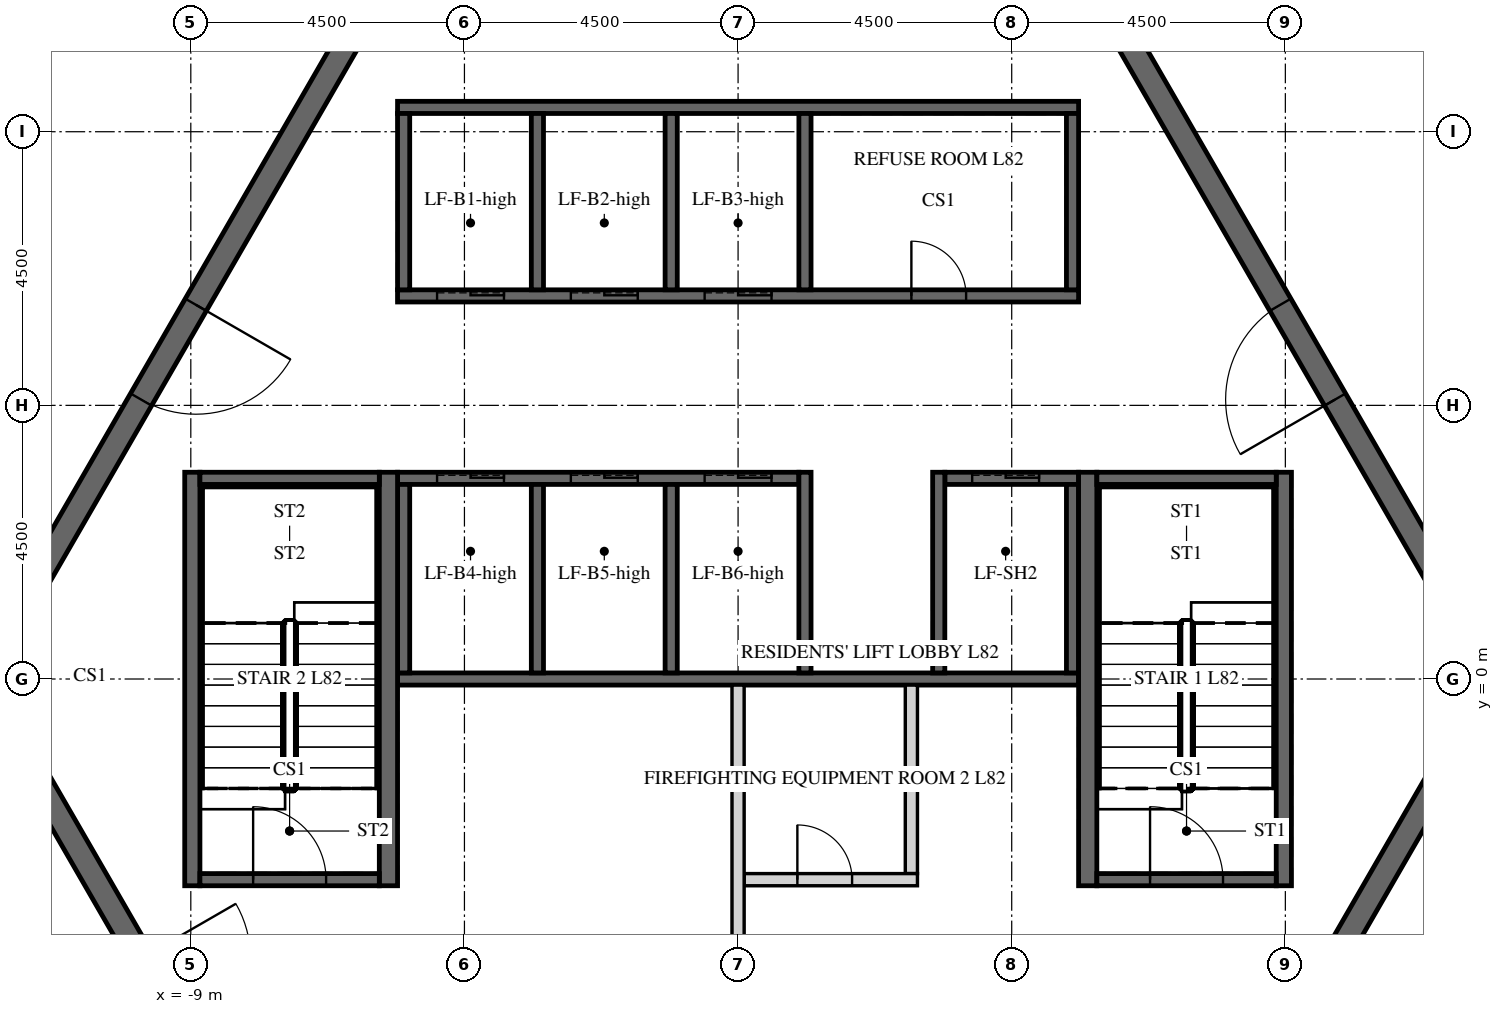
"""IFC4 building model, lengths in metres.
Left out: names, types, materials, properties, quantities, classifications, styles, units other than length and angle.
Written with IfcOpenShell. Run it as: python <this file> out.ifc"""

import sys

from ifc_helpers import new_model, si_unit, direction, frame, frame_2d, origin, place, context, subcontext, project, spatial, polyline, rectangle, outline, extrude, element, fill, save


model = new_model("IFC4")
c1 = context("Model", 3, precision=1e-05, world=origin(), true_north=direction((0.0, 1.0)))
c2 = subcontext(c1, "Body", "Model", "MODEL_VIEW")
j1 = project(units=[si_unit("LENGTHUNIT", "METRE"), si_unit("PLANEANGLEUNIT", "RADIAN")], contexts=[c1])
p1 = place(None, origin())
s1 = spatial("IfcSite", under=j1, at=p1, CompositionType="ELEMENT")
p2 = place(p1, origin())
s2 = spatial("IfcBuilding", under=s1, at=p2, CompositionType="ELEMENT")
p3 = place(p2, frame((0.0, 0.0, 338.1)))
s3 = spatial("IfcBuildingStorey", under=s2, at=p3, CompositionType="ELEMENT", Elevation=338.1)
p4 = place(p3, frame((-6.235, 10.8, -0.3), z_axis=(0.0, 0.0, 1.0), x_axis=(-0.499996419489, -0.866027470984, 0.0)))
e1 = element("IfcWall", 1, at=p4, inside=s3, PredefinedType="SHEAR", context=c2, shape_type="SweptSolid", body=[
    extrude(outline(polyline([(-0.115, -0.2), (12.586, -0.2), (12.355, 0.2), (0.115, 0.2), (-0.115, -0.2)])), origin(), (0.0, 0.0, 1.0), 5.4),
])
p5 = place(p4, frame((5.364, 0.0, 0.3)))
e2 = element("IfcOpeningElement", 2, at=p5, cuts=e1, PredefinedType="OPENING", context=c2, shape_type="SweptSolid", body=[
    extrude(rectangle(XDim=1.8, YDim=2.4, at=frame_2d((0.9, 1.2))), frame((0.0, 0.21, 0.0), z_axis=(0.0, -1.0, 0.0), x_axis=(1.0, 0.0, 0.0)), (0.0, 0.0, 1.0), 0.42),
])
p6 = place(p3, frame((-12.471, 0.0, -0.3), z_axis=(0.0, 0.0, 1.0), x_axis=(0.499996419489, -0.866027470984, 0.0)))
e3 = element("IfcWall", 3, at=p6, inside=s3, PredefinedType="SHEAR", context=c2, shape_type="SweptSolid", body=[
    extrude(outline(polyline([(-0.115, -0.2), (12.586, -0.2), (12.355, 0.2), (0.115, 0.2), (-0.115, -0.2)])), origin(), (0.0, 0.0, 1.0), 5.4),
])
p7 = place(p6, frame((5.306, 0.0, 0.3)))
e4 = element("IfcOpeningElement", 4, at=p7, cuts=e3, PredefinedType="OPENING", context=c2, shape_type="SweptSolid", body=[
    extrude(rectangle(XDim=1.8, YDim=2.4, at=frame_2d((0.9, 1.2))), frame((0.0, 0.21, 0.0), z_axis=(0.0, -1.0, 0.0), x_axis=(1.0, 0.0, 0.0)), (0.0, 0.0, 1.0), 0.42),
])
p8 = place(p3, frame((6.235, -10.8, -0.3), z_axis=(0.0, 0.0, 1.0), x_axis=(0.499996419489, 0.866027470984, 0.0)))
e5 = element("IfcWall", 5, at=p8, inside=s3, PredefinedType="SHEAR", context=c2, shape_type="SweptSolid", body=[
    extrude(outline(polyline([(-0.115, -0.2), (12.586, -0.2), (12.355, 0.2), (0.115, 0.2), (-0.115, -0.2)])), origin(), (0.0, 0.0, 1.0), 5.4),
])
p9 = place(p8, frame((5.364, 0.0, 0.3)))
e6 = element("IfcOpeningElement", 6, at=p9, cuts=e5, PredefinedType="OPENING", context=c2, shape_type="SweptSolid", body=[
    extrude(rectangle(XDim=1.8, YDim=2.4, at=frame_2d((0.9, 1.2))), frame((0.0, 0.21, 0.0), z_axis=(0.0, -1.0, 0.0), x_axis=(1.0, 0.0, 0.0)), (0.0, 0.0, 1.0), 0.42),
])
p10 = place(p3, frame((12.471, 0.0, -0.3), z_axis=(0.0, 0.0, 1.0), x_axis=(-0.499996419489, 0.866027470984, 0.0)))
e7 = element("IfcWall", 7, at=p10, inside=s3, PredefinedType="SHEAR", context=c2, shape_type="SweptSolid", body=[
    extrude(outline(polyline([(-0.115, -0.2), (12.586, -0.2), (12.355, 0.2), (0.115, 0.2), (-0.115, -0.2)])), origin(), (0.0, 0.0, 1.0), 5.4),
])
p11 = place(p10, frame((5.306, 0.0, 0.3)))
e8 = element("IfcOpeningElement", 8, at=p11, cuts=e7, PredefinedType="OPENING", context=c2, shape_type="SweptSolid", body=[
    extrude(rectangle(XDim=1.8, YDim=2.4, at=frame_2d((0.9, 1.2))), frame((0.0, 0.21, 0.0), z_axis=(0.0, -1.0, 0.0), x_axis=(1.0, 0.0, 0.0)), (0.0, 0.0, 1.0), 0.42),
])
p12 = place(p3, frame((-5.6, 6.3, -0.25), z_axis=(0.0, 0.0, 1.0), x_axis=(1.0, 0.0, 0.0)))
e9 = element("IfcWall", 9, at=p12, inside=s3, PredefinedType="SHEAR", context=c2, shape_type="SweptSolid", body=[
    extrude(rectangle(XDim=11.2, YDim=0.2, at=frame_2d((5.6, 0.0))), origin(), (0.0, 0.0, 1.0), 5.4),
])
p13 = place(p12, frame((8.45, 0.0, 0.25)))
e10 = element("IfcOpeningElement", 10, at=p13, cuts=e9, PredefinedType="OPENING", context=c2, shape_type="SweptSolid", body=[
    extrude(rectangle(XDim=0.9, YDim=2.1, at=frame_2d((0.45, 1.05))), frame((0.0, 0.11, 0.0), z_axis=(0.0, -1.0, 0.0), x_axis=(1.0, 0.0, 0.0)), (0.0, 0.0, 1.0), 0.22),
])
p14 = place(p12, frame((0.65, 0.0, 0.25)))
e11 = element("IfcOpeningElement", 11, at=p14, cuts=e9, PredefinedType="OPENING", context=c2, shape_type="SweptSolid", body=[
    extrude(rectangle(XDim=1.1, YDim=2.1, at=frame_2d((0.55, 1.05))), frame((0.0, 0.11, 0.0), z_axis=(0.0, -1.0, 0.0), x_axis=(1.0, 0.0, 0.0)), (0.0, 0.0, 1.0), 0.22),
])
p15 = place(p12, frame((2.85, 0.0, 0.25)))
e12 = element("IfcOpeningElement", 12, at=p15, cuts=e9, PredefinedType="OPENING", context=c2, shape_type="SweptSolid", body=[
    extrude(rectangle(XDim=1.1, YDim=2.1, at=frame_2d((0.55, 1.05))), frame((0.0, 0.11, 0.0), z_axis=(0.0, -1.0, 0.0), x_axis=(1.0, 0.0, 0.0)), (0.0, 0.0, 1.0), 0.22),
])
p16 = place(p12, frame((5.05, 0.0, 0.25)))
e13 = element("IfcOpeningElement", 13, at=p16, cuts=e9, PredefinedType="OPENING", context=c2, shape_type="SweptSolid", body=[
    extrude(rectangle(XDim=1.1, YDim=2.1, at=frame_2d((0.55, 1.05))), frame((0.0, 0.11, 0.0), z_axis=(0.0, -1.0, 0.0), x_axis=(1.0, 0.0, 0.0)), (0.0, 0.0, 1.0), 0.22),
])
p17 = place(p3, frame((-5.6, 9.4, -0.25), z_axis=(0.0, 0.0, 1.0), x_axis=(1.0, 0.0, 0.0)))
e14 = element("IfcWall", 14, at=p17, inside=s3, PredefinedType="SHEAR", context=c2, shape_type="SweptSolid", body=[
    extrude(rectangle(XDim=11.2, YDim=0.2, at=frame_2d((5.6, 0.0))), origin(), (0.0, 0.0, 1.0), 5.4),
])
for number, where, z_axis, x_axis in (
    (15, (-5.5, 6.4, -0.25), (0.0, 0.0, 1.0), (0.0, 1.0, 0.0)),
    (16, (-3.3, 6.4, -0.25), (0.0, 0.0, 1.0), (0.0, 1.0, 0.0)),
    (17, (-1.1, 6.4, -0.25), (0.0, 0.0, 1.0), (0.0, 1.0, 0.0)),
    (18, (1.1, 6.4, -0.25), (0.0, 0.0, 1.0), (0.0, 1.0, 0.0)),
    (19, (5.5, 6.4, -0.25), (0.0, 0.0, 1.0), (0.0, 1.0, 0.0)),
):
    element("IfcWall", number, at=place(p3, frame(where, z_axis=z_axis, x_axis=x_axis)), inside=s3, PredefinedType="SHEAR", context=c2, shape_type="SweptSolid", body=[
        extrude(rectangle(XDim=2.9, YDim=0.2, at=frame_2d((1.45, 0.0))), origin(), (0.0, 0.0, 1.0), 5.4),
    ])
p18 = place(p3, frame((-5.6, 3.3, -0.25), z_axis=(0.0, 0.0, 1.0), x_axis=(1.0, 0.0, 0.0)))
e20 = element("IfcWall", 20, at=p18, inside=s3, PredefinedType="SHEAR", context=c2, shape_type="SweptSolid", body=[
    extrude(rectangle(XDim=6.6, YDim=0.2, at=frame_2d((3.3, 0.0))), origin(), (0.0, 0.0, 1.0), 5.4),
])
p19 = place(p18, frame((0.65, 0.0, 0.25)))
e21 = element("IfcOpeningElement", 21, at=p19, cuts=e20, PredefinedType="OPENING", context=c2, shape_type="SweptSolid", body=[
    extrude(rectangle(XDim=1.1, YDim=2.1, at=frame_2d((0.55, 1.05))), frame((0.0, 0.11, 0.0), z_axis=(0.0, -1.0, 0.0), x_axis=(1.0, 0.0, 0.0)), (0.0, 0.0, 1.0), 0.22),
])
p20 = place(p18, frame((2.85, 0.0, 0.25)))
e22 = element("IfcOpeningElement", 22, at=p20, cuts=e20, PredefinedType="OPENING", context=c2, shape_type="SweptSolid", body=[
    extrude(rectangle(XDim=1.1, YDim=2.1, at=frame_2d((0.55, 1.05))), frame((0.0, 0.11, 0.0), z_axis=(0.0, -1.0, 0.0), x_axis=(1.0, 0.0, 0.0)), (0.0, 0.0, 1.0), 0.22),
])
p21 = place(p18, frame((5.05, 0.0, 0.25)))
e23 = element("IfcOpeningElement", 23, at=p21, cuts=e20, PredefinedType="OPENING", context=c2, shape_type="SweptSolid", body=[
    extrude(rectangle(XDim=1.1, YDim=2.1, at=frame_2d((0.55, 1.05))), frame((0.0, 0.11, 0.0), z_axis=(0.0, -1.0, 0.0), x_axis=(1.0, 0.0, 0.0)), (0.0, 0.0, 1.0), 0.22),
])
p22 = place(p3, frame((3.4, 3.3, -0.25), z_axis=(0.0, 0.0, 1.0), x_axis=(1.0, 0.0, 0.0)))
e24 = element("IfcWall", 24, at=p22, inside=s3, PredefinedType="SHEAR", context=c2, shape_type="SweptSolid", body=[
    extrude(rectangle(XDim=2.2, YDim=0.2, at=frame_2d((1.1, 0.0))), origin(), (0.0, 0.0, 1.0), 5.4),
])
p23 = place(p22, frame((0.45, 0.0, 0.25)))
e25 = element("IfcOpeningElement", 25, at=p23, cuts=e24, PredefinedType="OPENING", context=c2, shape_type="SweptSolid", body=[
    extrude(rectangle(XDim=1.1, YDim=2.1, at=frame_2d((0.55, 1.05))), frame((0.0, 0.11, 0.0), z_axis=(0.0, -1.0, 0.0), x_axis=(1.0, 0.0, 0.0)), (0.0, 0.0, 1.0), 0.22),
])
p24 = place(p3, frame((-5.6, 0.0, -0.25), z_axis=(0.0, 0.0, 1.0), x_axis=(1.0, 0.0, 0.0)))
e26 = element("IfcWall", 26, at=p24, inside=s3, PredefinedType="SHEAR", context=c2, shape_type="SweptSolid", body=[
    extrude(rectangle(XDim=11.2, YDim=0.2, at=frame_2d((5.6, 0.0))), origin(), (0.0, 0.0, 1.0), 5.4),
])
for number, where, z_axis, x_axis in (
    (27, (-5.5, 0.1, -0.25), (0.0, 0.0, 1.0), (0.0, 1.0, 0.0)),
    (28, (-3.3, 0.1, -0.25), (0.0, 0.0, 1.0), (0.0, 1.0, 0.0)),
    (29, (-1.1, 0.1, -0.25), (0.0, 0.0, 1.0), (0.0, 1.0, 0.0)),
):
    element("IfcWall", number, at=place(p3, frame(where, z_axis=z_axis, x_axis=x_axis)), inside=s3, PredefinedType="SHEAR", context=c2, shape_type="SweptSolid", body=[
        extrude(rectangle(XDim=3.1, YDim=0.2, at=frame_2d((1.55, 0.0))), origin(), (0.0, 0.0, 1.0), 5.4),
    ])
for number, where, z_axis, x_axis in (
    (30, (1.1, 0.1, -0.25), (0.0, 0.0, 1.0), (0.0, 1.0, 0.0)),
    (31, (3.3, 0.1, -0.25), (0.0, 0.0, 1.0), (0.0, 1.0, 0.0)),
):
    element("IfcWall", number, at=place(p3, frame(where, z_axis=z_axis, x_axis=x_axis)), inside=s3, PredefinedType="SHEAR", context=c2, shape_type="SweptSolid", body=[
        extrude(rectangle(XDim=3.3, YDim=0.2, at=frame_2d((1.65, 0.0))), origin(), (0.0, 0.0, 1.0), 5.4),
    ])
p25 = place(p3, frame((5.5, 0.1, -0.25), z_axis=(0.0, 0.0, 1.0), x_axis=(0.0, 1.0, 0.0)))
e32 = element("IfcWall", 32, at=p25, inside=s3, PredefinedType="SHEAR", context=c2, shape_type="SweptSolid", body=[
    extrude(rectangle(XDim=3.1, YDim=0.2, at=frame_2d((1.55, 0.0))), origin(), (0.0, 0.0, 1.0), 5.4),
])
p26 = place(p3, frame((0.1, -3.3, 0.0), z_axis=(0.0, 0.0, 1.0), x_axis=(1.0, 0.0, 0.0)))
e33 = element("IfcWall", 33, at=p26, inside=s3, PredefinedType="PARTITIONING", context=c2, shape_type="SweptSolid", body=[
    extrude(rectangle(XDim=2.85, YDim=0.2, at=frame_2d((1.425, 0.0))), origin(), (0.0, 0.0, 1.0), 5.15),
])
p27 = place(p26, frame((0.875, 0.0, 0.0)))
e34 = element("IfcOpeningElement", 34, at=p27, cuts=e33, PredefinedType="OPENING", context=c2, shape_type="SweptSolid", body=[
    extrude(rectangle(XDim=0.9, YDim=2.1, at=frame_2d((0.45, 1.05))), frame((0.0, 0.11, 0.0), z_axis=(0.0, -1.0, 0.0), x_axis=(1.0, 0.0, 0.0)), (0.0, 0.0, 1.0), 0.22),
])
p28 = place(p3, frame((2.85, -3.2, 0.0), z_axis=(0.0, 0.0, 1.0), x_axis=(0.0, 1.0, 0.0)))
e35 = element("IfcWall", 35, at=p28, inside=s3, PredefinedType="PARTITIONING", context=c2, shape_type="SweptSolid", body=[
    extrude(rectangle(XDim=3.1, YDim=0.2, at=frame_2d((1.55, 0.0))), origin(), (0.0, 0.0, 1.0), 5.15),
])
p29 = place(p3, frame((0.0, -6.2, 0.0), z_axis=(0.0, 0.0, 1.0), x_axis=(0.0, 1.0, 0.0)))
e36 = element("IfcWall", 36, at=p29, inside=s3, PredefinedType="PARTITIONING", context=c2, shape_type="SweptSolid", body=[
    extrude(rectangle(XDim=6.1, YDim=0.2, at=frame_2d((3.05, 0.0))), origin(), (0.0, 0.0, 1.0), 5.15),
])
p30 = place(p3, frame((5.75, -3.4, -0.25), z_axis=(0.0, 0.0, 1.0), x_axis=(0.0, 1.0, 0.0)))
e37 = element("IfcWall", 37, at=p30, inside=s3, PredefinedType="SHEAR", context=c2, shape_type="SweptSolid", body=[
    extrude(rectangle(XDim=6.8, YDim=0.3, at=frame_2d((3.4, 0.0))), origin(), (0.0, 0.0, 1.0), 5.4),
])
p31 = place(p3, frame((8.975, -3.4, -0.25), z_axis=(0.0, 0.0, 1.0), x_axis=(0.0, 1.0, 0.0)))
e38 = element("IfcWall", 38, at=p31, inside=s3, PredefinedType="SHEAR", context=c2, shape_type="SweptSolid", body=[
    extrude(rectangle(XDim=6.8, YDim=0.25, at=frame_2d((3.4, 0.0))), origin(), (0.0, 0.0, 1.0), 5.4),
])
p32 = place(p3, frame((5.9, 3.3, -0.25), z_axis=(0.0, 0.0, 1.0), x_axis=(1.0, 0.0, 0.0)))
e39 = element("IfcWall", 39, at=p32, inside=s3, PredefinedType="SHEAR", context=c2, shape_type="SweptSolid", body=[
    extrude(rectangle(XDim=2.95, YDim=0.2, at=frame_2d((1.475, 0.0))), origin(), (0.0, 0.0, 1.0), 5.4),
])
p33 = place(p3, frame((5.9, -3.3, -0.25), z_axis=(0.0, 0.0, 1.0), x_axis=(1.0, 0.0, 0.0)))
e40 = element("IfcWall", 40, at=p33, inside=s3, PredefinedType="SHEAR", context=c2, shape_type="SweptSolid", body=[
    extrude(rectangle(XDim=2.95, YDim=0.2, at=frame_2d((1.475, 0.0))), origin(), (0.0, 0.0, 1.0), 5.4),
])
p34 = place(p33, frame((0.875, 0.0, 0.25)))
e41 = element("IfcOpeningElement", 41, at=p34, cuts=e40, PredefinedType="OPENING", context=c2, shape_type="SweptSolid", body=[
    extrude(rectangle(XDim=1.2, YDim=2.4, at=frame_2d((0.6, 1.2))), frame((0.0, 0.11, 0.0), z_axis=(0.0, -1.0, 0.0), x_axis=(1.0, 0.0, 0.0)), (0.0, 0.0, 1.0), 0.22),
])
p35 = place(p3, frame((-5.75, -3.4, -0.25), z_axis=(0.0, 0.0, 1.0), x_axis=(0.0, 1.0, 0.0)))
e42 = element("IfcWall", 42, at=p35, inside=s3, PredefinedType="SHEAR", context=c2, shape_type="SweptSolid", body=[
    extrude(rectangle(XDim=6.8, YDim=0.3, at=frame_2d((3.4, 0.0))), origin(), (0.0, 0.0, 1.0), 5.4),
])
p36 = place(p3, frame((-8.975, -3.4, -0.25), z_axis=(0.0, 0.0, 1.0), x_axis=(0.0, 1.0, 0.0)))
e43 = element("IfcWall", 43, at=p36, inside=s3, PredefinedType="SHEAR", context=c2, shape_type="SweptSolid", body=[
    extrude(rectangle(XDim=6.8, YDim=0.25, at=frame_2d((3.4, 0.0))), origin(), (0.0, 0.0, 1.0), 5.4),
])
p37 = place(p3, frame((-8.85, 3.3, -0.25), z_axis=(0.0, 0.0, 1.0), x_axis=(1.0, 0.0, 0.0)))
e44 = element("IfcWall", 44, at=p37, inside=s3, PredefinedType="SHEAR", context=c2, shape_type="SweptSolid", body=[
    extrude(rectangle(XDim=2.95, YDim=0.2, at=frame_2d((1.475, 0.0))), origin(), (0.0, 0.0, 1.0), 5.4),
])
p38 = place(p3, frame((-8.85, -3.3, -0.25), z_axis=(0.0, 0.0, 1.0), x_axis=(1.0, 0.0, 0.0)))
e45 = element("IfcWall", 45, at=p38, inside=s3, PredefinedType="SHEAR", context=c2, shape_type="SweptSolid", body=[
    extrude(rectangle(XDim=2.95, YDim=0.2, at=frame_2d((1.475, 0.0))), origin(), (0.0, 0.0, 1.0), 5.4),
])
p39 = place(p38, frame((0.875, 0.0, 0.25)))
e46 = element("IfcOpeningElement", 46, at=p39, cuts=e45, PredefinedType="OPENING", context=c2, shape_type="SweptSolid", body=[
    extrude(rectangle(XDim=1.2, YDim=2.4, at=frame_2d((0.6, 1.2))), frame((0.0, 0.11, 0.0), z_axis=(0.0, -1.0, 0.0), x_axis=(1.0, 0.0, 0.0)), (0.0, 0.0, 1.0), 0.22),
])
p40 = place(p5, origin())
e47 = element("IfcDoor", 47, at=p40, inside=s3, OperationType="DOUBLE_DOOR_SINGLE_SWING", PredefinedType="DOOR", context=c2, shape_type="SweptSolid", body=[
    extrude(rectangle(XDim=1.8, YDim=2.4, at=frame_2d((0.9, 1.2))), frame((0.0, 0.025, 0.0), z_axis=(0.0, -1.0, 0.0), x_axis=(1.0, 0.0, 0.0)), (0.0, 0.0, 1.0), 0.05),
])
fill(e2, e47)
p41 = place(p11, origin())
e48 = element("IfcDoor", 48, at=p41, inside=s3, OperationType="DOUBLE_DOOR_SINGLE_SWING", PredefinedType="DOOR", context=c2, shape_type="SweptSolid", body=[
    extrude(rectangle(XDim=1.8, YDim=2.4, at=frame_2d((0.9, 1.2))), frame((0.0, 0.025, 0.0), z_axis=(0.0, -1.0, 0.0), x_axis=(1.0, 0.0, 0.0)), (0.0, 0.0, 1.0), 0.05),
])
fill(e8, e48)
p42 = place(p27, origin())
e49 = element("IfcDoor", 49, at=p42, inside=s3, OperationType="SINGLE_SWING_LEFT", PredefinedType="DOOR", context=c2, shape_type="SweptSolid", body=[
    extrude(rectangle(XDim=0.9, YDim=2.1, at=frame_2d((0.45, 1.05))), frame((0.0, 0.025, 0.0), z_axis=(0.0, -1.0, 0.0), x_axis=(1.0, 0.0, 0.0)), (0.0, 0.0, 1.0), 0.05),
])
fill(e34, e49)
p43 = place(p13, origin())
e50 = element("IfcDoor", 50, at=p43, inside=s3, OperationType="SINGLE_SWING_LEFT", PredefinedType="DOOR", context=c2, shape_type="SweptSolid", body=[
    extrude(rectangle(XDim=0.9, YDim=2.1, at=frame_2d((0.45, 1.05))), frame((0.0, 0.025, 0.0), z_axis=(0.0, -1.0, 0.0), x_axis=(1.0, 0.0, 0.0)), (0.0, 0.0, 1.0), 0.05),
])
fill(e10, e50)
p44 = place(p34, origin())
e51 = element("IfcDoor", 51, at=p44, inside=s3, OperationType="SINGLE_SWING_LEFT", PredefinedType="DOOR", context=c2, shape_type="SweptSolid", body=[
    extrude(rectangle(XDim=1.2, YDim=2.4, at=frame_2d((0.6, 1.2))), frame((0.0, 0.025, 0.0), z_axis=(0.0, -1.0, 0.0), x_axis=(1.0, 0.0, 0.0)), (0.0, 0.0, 1.0), 0.05),
])
fill(e41, e51)
p45 = place(p39, origin())
e52 = element("IfcDoor", 52, at=p45, inside=s3, OperationType="SINGLE_SWING_LEFT", PredefinedType="DOOR", context=c2, shape_type="SweptSolid", body=[
    extrude(rectangle(XDim=1.2, YDim=2.4, at=frame_2d((0.6, 1.2))), frame((0.0, 0.025, 0.0), z_axis=(0.0, -1.0, 0.0), x_axis=(1.0, 0.0, 0.0)), (0.0, 0.0, 1.0), 0.05),
])
fill(e46, e52)
p46 = place(p14, origin())
e53 = element("IfcDoor", 53, at=p46, inside=s3, OperationType="SLIDING_TO_LEFT", PredefinedType="DOOR", context=c2, shape_type="SweptSolid", body=[
    extrude(rectangle(XDim=1.1, YDim=2.1, at=frame_2d((0.55, 1.05))), frame((0.0, 0.025, 0.0), z_axis=(0.0, -1.0, 0.0), x_axis=(1.0, 0.0, 0.0)), (0.0, 0.0, 1.0), 0.05),
])
fill(e11, e53)
p47 = place(p15, origin())
e54 = element("IfcDoor", 54, at=p47, inside=s3, OperationType="SLIDING_TO_LEFT", PredefinedType="DOOR", context=c2, shape_type="SweptSolid", body=[
    extrude(rectangle(XDim=1.1, YDim=2.1, at=frame_2d((0.55, 1.05))), frame((0.0, 0.025, 0.0), z_axis=(0.0, -1.0, 0.0), x_axis=(1.0, 0.0, 0.0)), (0.0, 0.0, 1.0), 0.05),
])
fill(e12, e54)
p48 = place(p16, origin())
e55 = element("IfcDoor", 55, at=p48, inside=s3, OperationType="SLIDING_TO_LEFT", PredefinedType="DOOR", context=c2, shape_type="SweptSolid", body=[
    extrude(rectangle(XDim=1.1, YDim=2.1, at=frame_2d((0.55, 1.05))), frame((0.0, 0.025, 0.0), z_axis=(0.0, -1.0, 0.0), x_axis=(1.0, 0.0, 0.0)), (0.0, 0.0, 1.0), 0.05),
])
fill(e13, e55)
p49 = place(p19, origin())
e56 = element("IfcDoor", 56, at=p49, inside=s3, OperationType="SLIDING_TO_LEFT", PredefinedType="DOOR", context=c2, shape_type="SweptSolid", body=[
    extrude(rectangle(XDim=1.1, YDim=2.1, at=frame_2d((0.55, 1.05))), frame((0.0, 0.025, 0.0), z_axis=(0.0, -1.0, 0.0), x_axis=(1.0, 0.0, 0.0)), (0.0, 0.0, 1.0), 0.05),
])
fill(e21, e56)
p50 = place(p20, origin())
e57 = element("IfcDoor", 57, at=p50, inside=s3, OperationType="SLIDING_TO_LEFT", PredefinedType="DOOR", context=c2, shape_type="SweptSolid", body=[
    extrude(rectangle(XDim=1.1, YDim=2.1, at=frame_2d((0.55, 1.05))), frame((0.0, 0.025, 0.0), z_axis=(0.0, -1.0, 0.0), x_axis=(1.0, 0.0, 0.0)), (0.0, 0.0, 1.0), 0.05),
])
fill(e22, e57)
p51 = place(p21, origin())
e58 = element("IfcDoor", 58, at=p51, inside=s3, OperationType="SLIDING_TO_LEFT", PredefinedType="DOOR", context=c2, shape_type="SweptSolid", body=[
    extrude(rectangle(XDim=1.1, YDim=2.1, at=frame_2d((0.55, 1.05))), frame((0.0, 0.025, 0.0), z_axis=(0.0, -1.0, 0.0), x_axis=(1.0, 0.0, 0.0)), (0.0, 0.0, 1.0), 0.05),
])
fill(e23, e58)
p52 = place(p23, origin())
e59 = element("IfcDoor", 59, at=p52, inside=s3, OperationType="SLIDING_TO_LEFT", PredefinedType="DOOR", context=c2, shape_type="SweptSolid", body=[
    extrude(rectangle(XDim=1.1, YDim=2.1, at=frame_2d((0.55, 1.05))), frame((0.0, 0.025, 0.0), z_axis=(0.0, -1.0, 0.0), x_axis=(1.0, 0.0, 0.0)), (0.0, 0.0, 1.0), 0.05),
])
fill(e25, e59)
save(model, sys.argv[1])
